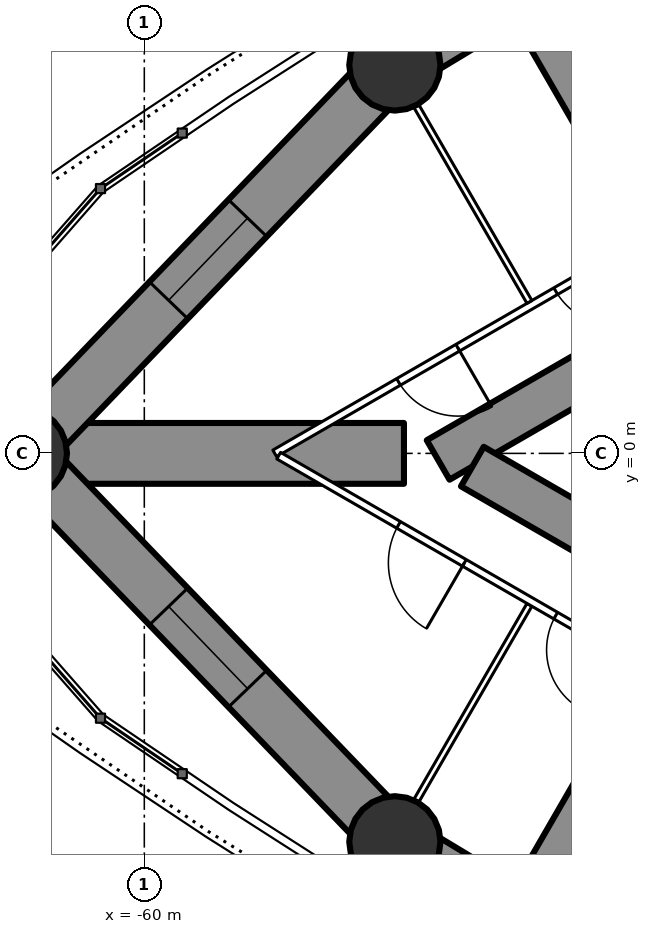
"""IFC4 building model, lengths in metres.
Left out: names, types, materials, properties, quantities, classifications, styles, units other than length and angle.
Written with IfcOpenShell. Run it as: python <this file> out.ifc"""

import sys

from ifc_helpers import new_model, si_unit, direction, frame, frame_2d, origin, origin_2d, place, context, subcontext, project, spatial, rectangle, circle, extrude, element, fill, save


model = new_model("IFC4")
c1 = context("Model", 3, precision=1e-05, world=origin(), true_north=direction((0.0, 1.0)))
c2 = subcontext(c1, "Body", "Model", "MODEL_VIEW")
j1 = project(units=[si_unit("LENGTHUNIT", "METRE"), si_unit("PLANEANGLEUNIT", "RADIAN")], contexts=[c1])
p1 = place(None, origin())
s1 = spatial("IfcSite", under=j1, at=p1, CompositionType="ELEMENT")
p2 = place(p1, origin())
s2 = spatial("IfcBuilding", under=s1, at=p2, CompositionType="ELEMENT")
p3 = place(p2, frame((0.0, 0.0, 210.3)))
s3 = spatial("IfcBuildingStorey", under=s2, at=p3, CompositionType="ELEMENT", Elevation=210.3)
for number, where, z_axis, x_axis in (
    (1, (-63.234, 0.0, 0.0), (0.0, 0.0, 1.0), (1.0, 0.0, 0.0)),
    (2, (-53.408, -10.219, 0.0), (0.0, 0.0, 1.0), (1.0, 0.0, 0.0)),
    (3, (-53.408, 10.219, 0.0), (0.0, 0.0, 1.0), (1.0, 0.0, 0.0)),
):
    element("IfcColumn", number, at=place(p3, frame(where, z_axis=z_axis, x_axis=x_axis)), inside=s3, PredefinedType="COLUMN", context=c2, shape_type="SweptSolid", body=[
        extrude(circle(Radius=1.2, at=origin_2d()), origin(), (0.0, 0.0, 1.0), 5.0),
    ])
p4 = place(p3, frame((-27.2, 14.3, 0.0), z_axis=(0.0, 0.0, 1.0), x_axis=(-0.866026593062, -0.499997940104, 0.0)))
e4 = element("IfcWall", 4, at=p4, inside=s3, PredefinedType="SHEAR", context=c2, shape_type="SweptSolid", body=[
    extrude(rectangle(XDim=28.946, YDim=1.2, at=frame_2d((14.473, 0.0))), origin(), (0.0, 0.0, 1.0), 5.0),
])
p5 = place(p4, frame((6.5, 0.0, 0.0)))
e5 = element("IfcOpeningElement", 5, at=p5, cuts=e4, PredefinedType="OPENING", context=c2, shape_type="SweptSolid", body=[
    extrude(rectangle(XDim=1.0, YDim=2.2, at=frame_2d((0.5, 1.1))), frame((0.0, 0.61, 0.0), z_axis=(0.0, -1.0, 0.0), x_axis=(1.0, 0.0, 0.0)), (0.0, 0.0, 1.0), 1.22),
])
p6 = place(p4, frame((13.568, 0.0, 0.0)))
e6 = element("IfcOpeningElement", 6, at=p6, cuts=e4, PredefinedType="OPENING", context=c2, shape_type="SweptSolid", body=[
    extrude(rectangle(XDim=1.8, YDim=2.2, at=frame_2d((0.9, 1.1))), frame((0.0, 0.61, 0.0), z_axis=(0.0, -1.0, 0.0), x_axis=(1.0, 0.0, 0.0)), (0.0, 0.0, 1.0), 1.22),
])
p7 = place(p3, frame((-27.2, -14.3, 0.0), z_axis=(0.0, 0.0, 1.0), x_axis=(-0.866024021859, 0.500002393557, 0.0)))
e7 = element("IfcWall", 7, at=p7, inside=s3, PredefinedType="SHEAR", context=c2, shape_type="SweptSolid", body=[
    extrude(rectangle(XDim=27.907, YDim=1.2, at=frame_2d((13.954, 0.0))), origin(), (0.0, 0.0, 1.0), 5.0),
])
p8 = place(p7, frame((6.5, 0.0, 0.0)))
e8 = element("IfcOpeningElement", 8, at=p8, cuts=e7, PredefinedType="OPENING", context=c2, shape_type="SweptSolid", body=[
    extrude(rectangle(XDim=1.0, YDim=2.2, at=frame_2d((0.5, 1.1))), frame((0.0, 0.61, 0.0), z_axis=(0.0, -1.0, 0.0), x_axis=(1.0, 0.0, 0.0)), (0.0, 0.0, 1.0), 1.22),
])
p9 = place(p7, frame((13.568, 0.0, 0.0)))
e9 = element("IfcOpeningElement", 9, at=p9, cuts=e7, PredefinedType="OPENING", context=c2, shape_type="SweptSolid", body=[
    extrude(rectangle(XDim=1.8, YDim=2.2, at=frame_2d((0.9, 1.1))), frame((0.0, 0.61, 0.0), z_axis=(0.0, -1.0, 0.0), x_axis=(1.0, 0.0, 0.0)), (0.0, 0.0, 1.0), 1.22),
])
p10 = place(p3, frame((-45.366, 4.504, 0.0), z_axis=(0.0, 0.0, 1.0), x_axis=(-0.499998848701, 0.866026068486, 0.0)))
e10 = element("IfcWall", 10, at=p10, inside=s3, PredefinedType="SHEAR", context=c2, shape_type="SweptSolid", body=[
    extrude(rectangle(XDim=9.048, YDim=1.6, at=frame_2d((4.524, 0.0))), origin(), (0.0, 0.0, 1.0), 5.0),
])
p11 = place(p10, frame((0.3, 0.0, 0.0)))
e11 = element("IfcOpeningElement", 11, at=p11, cuts=e10, PredefinedType="OPENING", context=c2, shape_type="SweptSolid", body=[
    extrude(rectangle(XDim=1.0, YDim=2.2, at=frame_2d((0.5, 1.1))), frame((0.0, 0.81, 0.0), z_axis=(0.0, -1.0, 0.0), x_axis=(1.0, 0.0, 0.0)), (0.0, 0.0, 1.0), 1.62),
])
p12 = place(p3, frame((-53.168, 0.0, 0.0), z_axis=(0.0, 0.0, 1.0), x_axis=(-1.0, 0.0, 0.0)))
e12 = element("IfcWall", 12, at=p12, inside=s3, PredefinedType="SHEAR", context=c2, shape_type="SweptSolid", body=[
    extrude(rectangle(XDim=10.066, YDim=1.6, at=frame_2d((5.033, 0.0))), origin(), (0.0, 0.0, 1.0), 5.0),
])
p13 = place(p3, frame((-45.366, -4.504, 0.0), z_axis=(0.0, 0.0, 1.0), x_axis=(-0.499998848701, -0.866026068486, 0.0)))
e13 = element("IfcWall", 13, at=p13, inside=s3, PredefinedType="SHEAR", context=c2, shape_type="SweptSolid", body=[
    extrude(rectangle(XDim=9.048, YDim=1.6, at=frame_2d((4.524, 0.0))), origin(), (0.0, 0.0, 1.0), 5.0),
])
p14 = place(p13, frame((0.3, 0.0, 0.0)))
e14 = element("IfcOpeningElement", 14, at=p14, cuts=e13, PredefinedType="OPENING", context=c2, shape_type="SweptSolid", body=[
    extrude(rectangle(XDim=1.0, YDim=2.2, at=frame_2d((0.5, 1.1))), frame((0.0, 0.81, 0.0), z_axis=(0.0, -1.0, 0.0), x_axis=(1.0, 0.0, 0.0)), (0.0, 0.0, 1.0), 1.62),
])
p15 = place(p3, frame((-49.89, 12.34, 0.0), z_axis=(0.0, 0.0, 1.0), x_axis=(-0.856358061538, -0.516382484636, 0.0)))
e15 = element("IfcWall", 15, at=p15, inside=s3, PredefinedType="SHEAR", context=c2, shape_type="SweptSolid", body=[
    extrude(rectangle(XDim=4.108, YDim=1.4, at=frame_2d((2.054, 0.0))), origin(), (0.0, 0.0, 1.0), 5.0),
])
p16 = place(p3, frame((-53.408, 10.219, 0.0), z_axis=(0.0, 0.0, 1.0), x_axis=(-0.693134527053, -0.720808245934, 0.0)))
e16 = element("IfcWall", 16, at=p16, inside=s3, PredefinedType="SHEAR", context=c2, shape_type="SweptSolid", body=[
    extrude(rectangle(XDim=14.177, YDim=1.4, at=frame_2d((7.089, 0.0))), origin(), (0.0, 0.0, 1.0), 5.0),
])
p17 = place(p16, frame((5.589, 0.0, 0.6)))
e17 = element("IfcOpeningElement", 17, at=p17, cuts=e16, PredefinedType="OPENING", context=c2, shape_type="SweptSolid", body=[
    extrude(rectangle(XDim=3.0, YDim=1.2, at=frame_2d((1.5, 0.6))), frame((0.0, 0.71, 0.0), z_axis=(0.0, -1.0, 0.0), x_axis=(1.0, 0.0, 0.0)), (0.0, 0.0, 1.0), 1.42),
])
p18 = place(p3, frame((-63.234, 0.0, 0.0), z_axis=(0.0, 0.0, 1.0), x_axis=(0.693134527053, -0.720808245934, 0.0)))
e18 = element("IfcWall", 18, at=p18, inside=s3, PredefinedType="SHEAR", context=c2, shape_type="SweptSolid", body=[
    extrude(rectangle(XDim=14.177, YDim=1.4, at=frame_2d((7.089, 0.0))), origin(), (0.0, 0.0, 1.0), 5.0),
])
p19 = place(p18, frame((5.589, 0.0, 0.6)))
e19 = element("IfcOpeningElement", 19, at=p19, cuts=e18, PredefinedType="OPENING", context=c2, shape_type="SweptSolid", body=[
    extrude(rectangle(XDim=3.0, YDim=1.2, at=frame_2d((1.5, 0.6))), frame((0.0, 0.71, 0.0), z_axis=(0.0, -1.0, 0.0), x_axis=(1.0, 0.0, 0.0)), (0.0, 0.0, 1.0), 1.42),
])
p20 = place(p3, frame((-53.408, -10.219, 0.0), z_axis=(0.0, 0.0, 1.0), x_axis=(0.856358061538, -0.516382484636, 0.0)))
e20 = element("IfcWall", 20, at=p20, inside=s3, PredefinedType="SHEAR", context=c2, shape_type="SweptSolid", body=[
    extrude(rectangle(XDim=4.108, YDim=1.4, at=frame_2d((2.054, 0.0))), origin(), (0.0, 0.0, 1.0), 5.0),
])
p21 = place(p3, frame((-28.737, 16.068, 0.0), z_axis=(0.0, 0.0, 1.0), x_axis=(-0.866026057212, -0.499998868229, 0.0)))
e21 = element("IfcWall", 21, at=p21, inside=s3, PredefinedType="PARTITIONING", context=c2, shape_type="SweptSolid", body=[
    extrude(rectangle(XDim=32.137, YDim=0.2, at=frame_2d((16.068, 0.0))), origin(), (0.0, 0.0, 1.0), 4.75),
])
p22 = place(p21, frame((7.134, 0.0, 0.0)))
e22 = element("IfcOpeningElement", 22, at=p22, cuts=e21, PredefinedType="OPENING", context=c2, shape_type="SweptSolid", body=[
    extrude(rectangle(XDim=2.0, YDim=2.4, at=frame_2d((1.0, 1.2))), frame((0.0, 0.11, 0.0), z_axis=(0.0, -1.0, 0.0), x_axis=(1.0, 0.0, 0.0)), (0.0, 0.0, 1.0), 0.22),
])
p23 = place(p21, frame((16.776, 0.0, 0.0)))
e23 = element("IfcOpeningElement", 23, at=p23, cuts=e21, PredefinedType="OPENING", context=c2, shape_type="SweptSolid", body=[
    extrude(rectangle(XDim=1.8, YDim=2.2, at=frame_2d((0.9, 1.1))), frame((0.0, 0.11, 0.0), z_axis=(0.0, -1.0, 0.0), x_axis=(1.0, 0.0, 0.0)), (0.0, 0.0, 1.0), 0.22),
])
p24 = place(p21, frame((21.799, 0.0, 0.0)))
e24 = element("IfcOpeningElement", 24, at=p24, cuts=e21, PredefinedType="OPENING", context=c2, shape_type="SweptSolid", body=[
    extrude(rectangle(XDim=1.8, YDim=2.2, at=frame_2d((0.9, 1.1))), frame((0.0, 0.11, 0.0), z_axis=(0.0, -1.0, 0.0), x_axis=(1.0, 0.0, 0.0)), (0.0, 0.0, 1.0), 0.22),
])
p25 = place(p21, frame((26.575, 0.0, 0.0)))
e25 = element("IfcOpeningElement", 25, at=p25, cuts=e21, PredefinedType="OPENING", context=c2, shape_type="SweptSolid", body=[
    extrude(rectangle(XDim=1.8, YDim=2.2, at=frame_2d((0.9, 1.1))), frame((0.0, 0.11, 0.0), z_axis=(0.0, -1.0, 0.0), x_axis=(1.0, 0.0, 0.0)), (0.0, 0.0, 1.0), 0.22),
])
for number, where, z_axis, x_axis in (
    (26, (-49.866, 3.985, 0.0), (0.0, 0.0, 1.0), (-0.5, 0.866, 0.0)),
    (27, (-49.866, -3.985, 0.0), (0.0, 0.0, 1.0), (-0.5, -0.866, 0.0)),
):
    element("IfcWall", number, at=place(p3, frame(where, z_axis=z_axis, x_axis=x_axis)), inside=s3, PredefinedType="PARTITIONING", context=c2, shape_type="SweptSolid", body=[
        extrude(rectangle(XDim=5.95, YDim=0.15, at=frame_2d((2.975, 0.0))), origin(), (0.0, 0.0, 1.0), 3.85),
    ])
p26 = place(p3, frame((-44.715, -6.844, 0.0), z_axis=(0.0, 0.0, 1.0), x_axis=(-0.866025261224, 0.500000246922, 0.0)))
e28 = element("IfcWall", 28, at=p26, inside=s3, PredefinedType="PARTITIONING", context=c2, shape_type="SweptSolid", body=[
    extrude(rectangle(XDim=13.567, YDim=0.2, at=frame_2d((6.783, 0.0))), origin(), (0.0, 0.0, 1.0), 4.75),
])
p27 = place(p26, frame((7.925, 0.0, 0.0)))
e29 = element("IfcOpeningElement", 29, at=p27, cuts=e28, PredefinedType="OPENING", context=c2, shape_type="SweptSolid", body=[
    extrude(rectangle(XDim=2.0, YDim=2.4, at=frame_2d((1.0, 1.2))), frame((0.0, 0.11, 0.0), z_axis=(0.0, -1.0, 0.0), x_axis=(1.0, 0.0, 0.0)), (0.0, 0.0, 1.0), 0.22),
])
p28 = place(p26, frame((3.349, 0.0, 0.0)))
e30 = element("IfcOpeningElement", 30, at=p28, cuts=e28, PredefinedType="OPENING", context=c2, shape_type="SweptSolid", body=[
    extrude(rectangle(XDim=1.8, YDim=2.2, at=frame_2d((0.9, 1.1))), frame((0.0, 0.11, 0.0), z_axis=(0.0, -1.0, 0.0), x_axis=(1.0, 0.0, 0.0)), (0.0, 0.0, 1.0), 0.22),
])
p29 = place(p17, origin())
e31 = element("IfcWindow", 31, at=p29, inside=s3, PartitioningType="SINGLE_PANEL", PredefinedType="WINDOW", context=c2, shape_type="SweptSolid", body=[
    extrude(rectangle(XDim=3.0, YDim=1.2, at=frame_2d((1.5, 0.6))), frame((0.0, 0.03, 0.0), z_axis=(0.0, -1.0, 0.0), x_axis=(1.0, 0.0, 0.0)), (0.0, 0.0, 1.0), 0.06),
])
fill(e17, e31)
p30 = place(p19, origin())
e32 = element("IfcWindow", 32, at=p30, inside=s3, PartitioningType="SINGLE_PANEL", PredefinedType="WINDOW", context=c2, shape_type="SweptSolid", body=[
    extrude(rectangle(XDim=3.0, YDim=1.2, at=frame_2d((1.5, 0.6))), frame((0.0, 0.03, 0.0), z_axis=(0.0, -1.0, 0.0), x_axis=(1.0, 0.0, 0.0)), (0.0, 0.0, 1.0), 0.06),
])
fill(e19, e32)
p31 = place(p24, origin())
e33 = element("IfcDoor", 33, at=p31, inside=s3, OperationType="DOUBLE_DOOR_SINGLE_SWING", PredefinedType="DOOR", context=c2, shape_type="SweptSolid", body=[
    extrude(rectangle(XDim=1.8, YDim=2.2, at=frame_2d((0.9, 1.1))), frame((0.0, 0.025, 0.0), z_axis=(0.0, -1.0, 0.0), x_axis=(1.0, 0.0, 0.0)), (0.0, 0.0, 1.0), 0.05),
])
fill(e24, e33)
p32 = place(p25, origin())
e34 = element("IfcDoor", 34, at=p32, inside=s3, OperationType="DOUBLE_DOOR_SINGLE_SWING", PredefinedType="DOOR", context=c2, shape_type="SweptSolid", body=[
    extrude(rectangle(XDim=1.8, YDim=2.2, at=frame_2d((0.9, 1.1))), frame((0.0, 0.025, 0.0), z_axis=(0.0, -1.0, 0.0), x_axis=(1.0, 0.0, 0.0)), (0.0, 0.0, 1.0), 0.05),
])
fill(e25, e34)
p33 = place(p27, origin())
e35 = element("IfcDoor", 35, at=p33, inside=s3, OperationType="DOUBLE_DOOR_SINGLE_SWING", PredefinedType="DOOR", context=c2, shape_type="SweptSolid", body=[
    extrude(rectangle(XDim=2.0, YDim=2.4, at=frame_2d((1.0, 1.2))), frame((0.0, 0.025, 0.0), z_axis=(0.0, -1.0, 0.0), x_axis=(1.0, 0.0, 0.0)), (0.0, 0.0, 1.0), 0.05),
])
fill(e29, e35)
p34 = place(p28, origin())
e36 = element("IfcDoor", 36, at=p34, inside=s3, OperationType="DOUBLE_DOOR_SINGLE_SWING", PredefinedType="DOOR", context=c2, shape_type="SweptSolid", body=[
    extrude(rectangle(XDim=1.8, YDim=2.2, at=frame_2d((0.9, 1.1))), frame((0.0, 0.025, 0.0), z_axis=(0.0, -1.0, 0.0), x_axis=(1.0, 0.0, 0.0)), (0.0, 0.0, 1.0), 0.05),
])
fill(e30, e36)
save(model, sys.argv[1])
